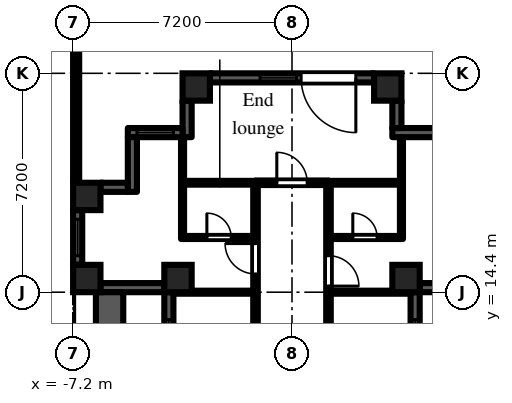
"""IFC4 building model, lengths in metres.
Left out: names, types, materials, properties, quantities, classifications, styles, units other than length and angle.
Written with IfcOpenShell. Run it as: python <this file> out.ifc"""

import sys

from ifc_helpers import new_model, si_unit, direction, frame, frame_2d, origin, origin_2d, place, context, subcontext, project, spatial, rectangle, extrude, element, fill, save


model = new_model("IFC4")
c1 = context("Model", 3, precision=1e-05, world=origin(), true_north=direction((0.0, 1.0)))
c2 = subcontext(c1, "Body", "Model", "MODEL_VIEW")
j1 = project(units=[si_unit("LENGTHUNIT", "METRE"), si_unit("PLANEANGLEUNIT", "RADIAN")], contexts=[c1])
p1 = place(None, origin())
s1 = spatial("IfcSite", under=j1, at=p1, CompositionType="ELEMENT")
p2 = place(p1, origin())
s2 = spatial("IfcBuilding", under=s1, at=p2, CompositionType="ELEMENT")
p3 = place(p2, frame((0.0, 0.0, 66.9)))
s3 = spatial("IfcBuildingStorey", under=s2, at=p3, CompositionType="ELEMENT", Elevation=66.9)
for number, where, z_axis, x_axis in (
    (1, (-6.75, 14.85, 0.0), (0.0, 0.0, 1.0), (1.0, 0.0, 0.0)),
    (2, (-6.75, 17.55, 0.0), (0.0, 0.0, 1.0), (1.0, 0.0, 0.0)),
    (3, (-3.75, 14.85, 0.0), (0.0, 0.0, 1.0), (1.0, 0.0, 0.0)),
    (4, (-3.15, 21.15, 0.0), (0.0, 0.0, 1.0), (1.0, 0.0, 0.0)),
    (5, (3.15, 21.15, 0.0), (0.0, 0.0, 1.0), (1.0, 0.0, 0.0)),
    (6, (3.75, 14.85, 0.0), (0.0, 0.0, 1.0), (1.0, 0.0, 0.0)),
):
    element("IfcColumn", number, at=place(p3, frame(where, z_axis=z_axis, x_axis=x_axis)), inside=s3, PredefinedType="COLUMN", context=c2, shape_type="SweptSolid", body=[
        extrude(rectangle(XDim=0.9, YDim=0.9, at=origin_2d()), origin(), (0.0, 0.0, 1.0), 3.0),
    ])
p4 = place(p3, frame((4.05, 7.2, 0.0), z_axis=(0.0, 0.0, 1.0), x_axis=(0.0, 1.0, 0.0)))
e7 = element("IfcWall", 7, at=p4, inside=s3, PredefinedType="SOLIDWALL", context=c2, shape_type="SweptSolid", body=[
    extrude(rectangle(XDim=7.2, YDim=0.3, at=frame_2d((3.6, 0.0))), origin(), (0.0, 0.0, 1.0), 2.1),
])
p5 = place(p4, frame((3.0, 0.0, 0.0)))
e8 = element("IfcOpeningElement", 8, at=p5, cuts=e7, PredefinedType="OPENING", context=c2, shape_type="SweptSolid", body=[
    extrude(rectangle(XDim=1.2, YDim=2.05, at=frame_2d((0.6, 1.025))), frame((0.0, 0.16, 0.0), z_axis=(0.0, -1.0, 0.0), x_axis=(1.0, 0.0, 0.0)), (0.0, 0.0, 1.0), 0.32),
])
p6 = place(p4, frame((0.9, 0.0, 0.2)))
e9 = element("IfcOpeningElement", 9, at=p6, cuts=e7, PredefinedType="OPENING", context=c2, shape_type="SweptSolid", body=[
    extrude(rectangle(XDim=1.8, YDim=1.85, at=frame_2d((0.9, 0.925))), frame((0.0, 0.16, 0.0), z_axis=(0.0, -1.0, 0.0), x_axis=(1.0, 0.0, 0.0)), (0.0, 0.0, 1.0), 0.32),
])
p7 = place(p4, frame((4.5, 0.0, 0.2)))
e10 = element("IfcOpeningElement", 10, at=p7, cuts=e7, PredefinedType="OPENING", context=c2, shape_type="SweptSolid", body=[
    extrude(rectangle(XDim=1.8, YDim=1.85, at=frame_2d((0.9, 0.925))), frame((0.0, 0.16, 0.0), z_axis=(0.0, -1.0, 0.0), x_axis=(1.0, 0.0, 0.0)), (0.0, 0.0, 1.0), 0.32),
])
p8 = place(p3, frame((4.2, 14.55, 0.0), z_axis=(0.0, 0.0, 1.0), x_axis=(1.0, 0.0, 0.0)))
e11 = element("IfcWall", 11, at=p8, inside=s3, PredefinedType="SOLIDWALL", context=c2, shape_type="SweptSolid", body=[
    extrude(rectangle(XDim=2.1, YDim=0.3, at=frame_2d((1.05, 0.0))), origin(), (0.0, 0.0, 1.0), 2.1),
])
p9 = place(p3, frame((5.1, 19.65, 0.0), z_axis=(0.0, 0.0, 1.0), x_axis=(-1.0, 0.0, 0.0)))
e12 = element("IfcWall", 12, at=p9, inside=s3, PredefinedType="SOLIDWALL", context=c2, shape_type="SweptSolid", body=[
    extrude(rectangle(XDim=1.8, YDim=0.3, at=frame_2d((0.9, 0.0))), origin(), (0.0, 0.0, 1.0), 2.575),
])
p10 = place(p3, frame((3.45, 19.8, 0.0), z_axis=(0.0, 0.0, 1.0), x_axis=(0.0, 1.0, 0.0)))
e13 = element("IfcWall", 13, at=p10, inside=s3, PredefinedType="SOLIDWALL", context=c2, shape_type="SweptSolid", body=[
    extrude(rectangle(XDim=0.9, YDim=0.3, at=frame_2d((0.45, 0.0))), origin(), (0.0, 0.0, 1.0), 2.575),
])
p11 = place(p3, frame((2.7, 21.45, 0.0), z_axis=(0.0, 0.0, 1.0), x_axis=(-1.0, 0.0, 0.0)))
e14 = element("IfcWall", 14, at=p11, inside=s3, PredefinedType="SOLIDWALL", context=c2, shape_type="SweptSolid", body=[
    extrude(rectangle(XDim=5.4, YDim=0.3, at=frame_2d((2.7, 0.0))), origin(), (0.0, 0.0, 1.0), 2.1),
])
p12 = place(p11, frame((0.6, 0.0, 0.0)))
e15 = element("IfcOpeningElement", 15, at=p12, cuts=e14, PredefinedType="OPENING", context=c2, shape_type="SweptSolid", body=[
    extrude(rectangle(XDim=1.8, YDim=2.05, at=frame_2d((0.9, 1.025))), frame((0.0, 0.16, 0.0), z_axis=(0.0, -1.0, 0.0), x_axis=(1.0, 0.0, 0.0)), (0.0, 0.0, 1.0), 0.32),
])
p13 = place(p11, frame((2.55, 0.0, 0.2)))
e16 = element("IfcOpeningElement", 16, at=p13, cuts=e14, PredefinedType="OPENING", context=c2, shape_type="SweptSolid", body=[
    extrude(rectangle(XDim=1.2, YDim=1.85, at=frame_2d((0.6, 0.925))), frame((0.0, 0.16, 0.0), z_axis=(0.0, -1.0, 0.0), x_axis=(1.0, 0.0, 0.0)), (0.0, 0.0, 1.0), 0.32),
])
p14 = place(p3, frame((-3.45, 20.7, 0.0), z_axis=(0.0, 0.0, 1.0), x_axis=(0.0, -1.0, 0.0)))
e17 = element("IfcWall", 17, at=p14, inside=s3, PredefinedType="SOLIDWALL", context=c2, shape_type="SweptSolid", body=[
    extrude(rectangle(XDim=1.2, YDim=0.3, at=frame_2d((0.6, 0.0))), origin(), (0.0, 0.0, 1.0), 2.575),
])
p15 = place(p3, frame((-3.6, 19.65, 0.0), z_axis=(0.0, 0.0, 1.0), x_axis=(-1.0, 0.0, 0.0)))
e18 = element("IfcWall", 18, at=p15, inside=s3, PredefinedType="SOLIDWALL", context=c2, shape_type="SweptSolid", body=[
    extrude(rectangle(XDim=1.8, YDim=0.3, at=frame_2d((0.9, 0.0))), origin(), (0.0, 0.0, 1.0), 2.575),
])
p16 = place(p15, frame((0.3, 0.0, 0.2)))
e19 = element("IfcOpeningElement", 19, at=p16, cuts=e18, PredefinedType="OPENING", context=c2, shape_type="SweptSolid", body=[
    extrude(rectangle(XDim=1.2, YDim=1.85, at=frame_2d((0.6, 0.925))), frame((0.0, 0.16, 0.0), z_axis=(0.0, -1.0, 0.0), x_axis=(1.0, 0.0, 0.0)), (0.0, 0.0, 1.0), 0.32),
])
p17 = place(p3, frame((-5.25, 19.5, 0.0), z_axis=(0.0, 0.0, 1.0), x_axis=(0.0, -1.0, 0.0)))
e20 = element("IfcWall", 20, at=p17, inside=s3, PredefinedType="SOLIDWALL", context=c2, shape_type="SweptSolid", body=[
    extrude(rectangle(XDim=1.8, YDim=0.3, at=frame_2d((0.9, 0.0))), origin(), (0.0, 0.0, 1.0), 2.575),
])
p18 = place(p3, frame((-5.4, 17.85, 0.0), z_axis=(0.0, 0.0, 1.0), x_axis=(-1.0, 0.0, 0.0)))
e21 = element("IfcWall", 21, at=p18, inside=s3, PredefinedType="SOLIDWALL", context=c2, shape_type="SweptSolid", body=[
    extrude(rectangle(XDim=0.9, YDim=0.3, at=frame_2d((0.45, 0.0))), origin(), (0.0, 0.0, 1.0), 2.575),
])
p19 = place(p3, frame((-7.05, 17.1, 0.0), z_axis=(0.0, 0.0, 1.0), x_axis=(0.0, -1.0, 0.0)))
e22 = element("IfcWall", 22, at=p19, inside=s3, PredefinedType="SOLIDWALL", context=c2, shape_type="SweptSolid", body=[
    extrude(rectangle(XDim=1.8, YDim=0.3, at=frame_2d((0.9, 0.0))), origin(), (0.0, 0.0, 1.0), 2.1),
])
p20 = place(p19, frame((0.3, 0.0, 0.2)))
e23 = element("IfcOpeningElement", 23, at=p20, cuts=e22, PredefinedType="OPENING", context=c2, shape_type="SweptSolid", body=[
    extrude(rectangle(XDim=1.2, YDim=1.85, at=frame_2d((0.6, 0.925))), frame((0.0, 0.16, 0.0), z_axis=(0.0, -1.0, 0.0), x_axis=(1.0, 0.0, 0.0)), (0.0, 0.0, 1.0), 0.32),
])
p21 = place(p3, frame((-6.3, 14.55, 0.0), z_axis=(0.0, 0.0, 1.0), x_axis=(1.0, 0.0, 0.0)))
e24 = element("IfcWall", 24, at=p21, inside=s3, PredefinedType="SOLIDWALL", context=c2, shape_type="SweptSolid", body=[
    extrude(rectangle(XDim=2.1, YDim=0.3, at=frame_2d((1.05, 0.0))), origin(), (0.0, 0.0, 1.0), 2.1),
])
p22 = place(p3, frame((-4.05, 14.4, 0.0), z_axis=(0.0, 0.0, 1.0), x_axis=(0.0, -1.0, 0.0)))
e25 = element("IfcWall", 25, at=p22, inside=s3, PredefinedType="SOLIDWALL", context=c2, shape_type="SweptSolid", body=[
    extrude(rectangle(XDim=7.2, YDim=0.3, at=frame_2d((3.6, 0.0))), origin(), (0.0, 0.0, 1.0), 2.1),
])
p23 = place(p22, frame((3.0, 0.0, 0.0)))
e26 = element("IfcOpeningElement", 26, at=p23, cuts=e25, PredefinedType="OPENING", context=c2, shape_type="SweptSolid", body=[
    extrude(rectangle(XDim=1.2, YDim=2.05, at=frame_2d((0.6, 1.025))), frame((0.0, 0.16, 0.0), z_axis=(0.0, -1.0, 0.0), x_axis=(1.0, 0.0, 0.0)), (0.0, 0.0, 1.0), 0.32),
])
p24 = place(p22, frame((0.9, 0.0, 0.2)))
e27 = element("IfcOpeningElement", 27, at=p24, cuts=e25, PredefinedType="OPENING", context=c2, shape_type="SweptSolid", body=[
    extrude(rectangle(XDim=1.8, YDim=1.85, at=frame_2d((0.9, 0.925))), frame((0.0, 0.16, 0.0), z_axis=(0.0, -1.0, 0.0), x_axis=(1.0, 0.0, 0.0)), (0.0, 0.0, 1.0), 0.32),
])
p25 = place(p22, frame((4.5, 0.0, 0.2)))
e28 = element("IfcOpeningElement", 28, at=p25, cuts=e25, PredefinedType="OPENING", context=c2, shape_type="SweptSolid", body=[
    extrude(rectangle(XDim=1.8, YDim=1.85, at=frame_2d((0.9, 0.925))), frame((0.0, 0.16, 0.0), z_axis=(0.0, -1.0, 0.0), x_axis=(1.0, 0.0, 0.0)), (0.0, 0.0, 1.0), 0.32),
])
p26 = place(p3, frame((-6.0, 7.2, 0.0), z_axis=(0.0, 0.0, 1.0), x_axis=(0.0, 1.0, 0.0)))
e29 = element("IfcWall", 29, at=p26, inside=s3, PredefinedType="PARAPET", context=c2, shape_type="SweptSolid", body=[
    extrude(rectangle(XDim=7.2, YDim=0.9, at=frame_2d((3.6, 0.0))), origin(), (0.0, 0.0, 1.0), 0.8),
])
p27 = place(p3, frame((-7.1, 39.6, 0.0), z_axis=(0.0, 0.0, 1.0), x_axis=(0.0, -1.0, 0.0)))
e30 = element("IfcWall", 30, at=p27, inside=s3, PredefinedType="PARAPET", context=c2, shape_type="SweptSolid", body=[
    extrude(rectangle(XDim=21.6, YDim=0.2, at=frame_2d((10.8, 0.0))), origin(), (0.0, 0.0, 1.0), 1.1),
])
p28 = place(p3, frame((-3.9, 14.4, 0.0), z_axis=(0.0, 0.0, 1.0), x_axis=(1.0, 0.0, 0.0)))
e31 = element("IfcWall", 31, at=p28, inside=s3, PredefinedType="PARTITIONING", context=c2, shape_type="SweptSolid", body=[
    extrude(rectangle(XDim=2.625, YDim=0.1, at=frame_2d((1.312, 0.0))), origin(), (0.0, 0.0, 1.0), 2.575),
])
p29 = place(p3, frame((-3.6, 16.15, 0.0), z_axis=(0.0, 0.0, 1.0), x_axis=(0.0, 1.0, 0.0)))
e32 = element("IfcWall", 32, at=p29, inside=s3, PredefinedType="PARTITIONING", context=c2, shape_type="SweptSolid", body=[
    extrude(rectangle(XDim=3.35, YDim=0.1, at=frame_2d((1.675, 0.0))), origin(), (0.0, 0.0, 1.0), 2.575),
])
p30 = place(p3, frame((-3.55, 16.2, 0.0), z_axis=(0.0, 0.0, 1.0), x_axis=(1.0, 0.0, 0.0)))
e33 = element("IfcWall", 33, at=p30, inside=s3, PredefinedType="PARTITIONING", context=c2, shape_type="SweptSolid", body=[
    extrude(rectangle(XDim=2.275, YDim=0.1, at=frame_2d((1.138, 0.0))), origin(), (0.0, 0.0, 1.0), 2.575),
])
p31 = place(p30, frame((0.75, 0.0, 0.0)))
e34 = element("IfcOpeningElement", 34, at=p31, cuts=e33, PredefinedType="OPENING", context=c2, shape_type="SweptSolid", body=[
    extrude(rectangle(XDim=0.8, YDim=2.1, at=frame_2d((0.4, 1.05))), frame((0.0, 0.06, 0.0), z_axis=(0.0, -1.0, 0.0), x_axis=(1.0, 0.0, 0.0)), (0.0, 0.0, 1.0), 0.12),
])
p32 = place(p3, frame((-3.55, 18.0, 0.0), z_axis=(0.0, 0.0, 1.0), x_axis=(1.0, 0.0, 0.0)))
e35 = element("IfcWall", 35, at=p32, inside=s3, PredefinedType="PARTITIONING", context=c2, shape_type="SweptSolid", body=[
    extrude(rectangle(XDim=2.35, YDim=0.125, at=frame_2d((1.175, 0.0))), origin(), (0.0, 0.0, 1.0), 2.575),
])
p33 = place(p3, frame((-1.2, 1.275, 0.0), z_axis=(0.0, 0.0, 1.0), x_axis=(0.0, 1.0, 0.0)))
e36 = element("IfcWall", 36, at=p33, inside=s3, PredefinedType="PARTITIONING", context=c2, shape_type="SweptSolid", body=[
    extrude(rectangle(XDim=16.65, YDim=0.15, at=frame_2d((8.325, 0.0))), origin(), (0.0, 0.0, 1.0), 2.575),
])
p34 = place(p33, frame((0.675, 0.0, 0.0)))
e37 = element("IfcOpeningElement", 37, at=p34, cuts=e36, PredefinedType="OPENING", context=c2, shape_type="SweptSolid", body=[
    extrude(rectangle(XDim=0.9, YDim=2.1, at=frame_2d((0.45, 1.05))), frame((0.0, 0.085, 0.0), z_axis=(0.0, -1.0, 0.0), x_axis=(1.0, 0.0, 0.0)), (0.0, 0.0, 1.0), 0.17),
])
p35 = place(p33, frame((3.675, 0.0, 0.0)))
e38 = element("IfcOpeningElement", 38, at=p35, cuts=e36, PredefinedType="OPENING", context=c2, shape_type="SweptSolid", body=[
    extrude(rectangle(XDim=0.9, YDim=2.1, at=frame_2d((0.45, 1.05))), frame((0.0, 0.085, 0.0), z_axis=(0.0, -1.0, 0.0), x_axis=(1.0, 0.0, 0.0)), (0.0, 0.0, 1.0), 0.17),
])
p36 = place(p33, frame((10.875, 0.0, 0.0)))
e39 = element("IfcOpeningElement", 39, at=p36, cuts=e36, PredefinedType="OPENING", context=c2, shape_type="SweptSolid", body=[
    extrude(rectangle(XDim=0.9, YDim=2.1, at=frame_2d((0.45, 1.05))), frame((0.0, 0.085, 0.0), z_axis=(0.0, -1.0, 0.0), x_axis=(1.0, 0.0, 0.0)), (0.0, 0.0, 1.0), 0.17),
])
p37 = place(p33, frame((13.725, 0.0, 0.0)))
e40 = element("IfcOpeningElement", 40, at=p37, cuts=e36, PredefinedType="OPENING", context=c2, shape_type="SweptSolid", body=[
    extrude(rectangle(XDim=1.0, YDim=2.1, at=frame_2d((0.5, 1.05))), frame((0.0, 0.085, 0.0), z_axis=(0.0, -1.0, 0.0), x_axis=(1.0, 0.0, 0.0)), (0.0, 0.0, 1.0), 0.17),
])
p38 = place(p3, frame((-1.2, 18.0, 0.0), z_axis=(0.0, 0.0, 1.0), x_axis=(1.0, 0.0, 0.0)))
e41 = element("IfcWall", 41, at=p38, inside=s3, PredefinedType="PARTITIONING", context=c2, shape_type="SweptSolid", body=[
    extrude(rectangle(XDim=2.4, YDim=0.15, at=frame_2d((1.2, 0.0))), origin(), (0.0, 0.0, 1.0), 2.575),
])
p39 = place(p38, frame((0.7, 0.0, 0.0)))
e42 = element("IfcOpeningElement", 42, at=p39, cuts=e41, PredefinedType="OPENING", context=c2, shape_type="SweptSolid", body=[
    extrude(rectangle(XDim=1.0, YDim=2.1, at=frame_2d((0.5, 1.05))), frame((0.0, 0.085, 0.0), z_axis=(0.0, -1.0, 0.0), x_axis=(1.0, 0.0, 0.0)), (0.0, 0.0, 1.0), 0.17),
])
p40 = place(p3, frame((1.2, 1.125, 0.0), z_axis=(0.0, 0.0, 1.0), x_axis=(0.0, 1.0, 0.0)))
e43 = element("IfcWall", 43, at=p40, inside=s3, PredefinedType="PARTITIONING", context=c2, shape_type="SweptSolid", body=[
    extrude(rectangle(XDim=16.8, YDim=0.15, at=frame_2d((8.4, 0.0))), origin(), (0.0, 0.0, 1.0), 2.575),
])
p41 = place(p40, frame((7.025, 0.0, 0.0)))
e44 = element("IfcOpeningElement", 44, at=p41, cuts=e43, PredefinedType="OPENING", context=c2, shape_type="SweptSolid", body=[
    extrude(rectangle(XDim=0.9, YDim=2.1, at=frame_2d((0.45, 1.05))), frame((0.0, 0.085, 0.0), z_axis=(0.0, -1.0, 0.0), x_axis=(1.0, 0.0, 0.0)), (0.0, 0.0, 1.0), 0.17),
])
p42 = place(p40, frame((10.625, 0.0, 0.0)))
e45 = element("IfcOpeningElement", 45, at=p42, cuts=e43, PredefinedType="OPENING", context=c2, shape_type="SweptSolid", body=[
    extrude(rectangle(XDim=0.9, YDim=2.1, at=frame_2d((0.45, 1.05))), frame((0.0, 0.085, 0.0), z_axis=(0.0, -1.0, 0.0), x_axis=(1.0, 0.0, 0.0)), (0.0, 0.0, 1.0), 0.17),
])
p43 = place(p40, frame((13.475, 0.0, 0.0)))
e46 = element("IfcOpeningElement", 46, at=p43, cuts=e43, PredefinedType="OPENING", context=c2, shape_type="SweptSolid", body=[
    extrude(rectangle(XDim=1.0, YDim=2.1, at=frame_2d((0.5, 1.05))), frame((0.0, 0.085, 0.0), z_axis=(0.0, -1.0, 0.0), x_axis=(1.0, 0.0, 0.0)), (0.0, 0.0, 1.0), 0.17),
])
p44 = place(p3, frame((1.275, 14.4, 0.0), z_axis=(0.0, 0.0, 1.0), x_axis=(1.0, 0.0, 0.0)))
e47 = element("IfcWall", 47, at=p44, inside=s3, PredefinedType="PARTITIONING", context=c2, shape_type="SweptSolid", body=[
    extrude(rectangle(XDim=2.625, YDim=0.1, at=frame_2d((1.312, 0.0))), origin(), (0.0, 0.0, 1.0), 2.575),
])
p45 = place(p3, frame((1.275, 16.2, 0.0), z_axis=(0.0, 0.0, 1.0), x_axis=(1.0, 0.0, 0.0)))
e48 = element("IfcWall", 48, at=p45, inside=s3, PredefinedType="PARTITIONING", context=c2, shape_type="SweptSolid", body=[
    extrude(rectangle(XDim=2.375, YDim=0.1, at=frame_2d((1.188, 0.0))), origin(), (0.0, 0.0, 1.0), 2.575),
])
p46 = place(p45, frame((0.725, 0.0, 0.0)))
e49 = element("IfcOpeningElement", 49, at=p46, cuts=e48, PredefinedType="OPENING", context=c2, shape_type="SweptSolid", body=[
    extrude(rectangle(XDim=0.8, YDim=2.1, at=frame_2d((0.4, 1.05))), frame((0.0, 0.06, 0.0), z_axis=(0.0, -1.0, 0.0), x_axis=(1.0, 0.0, 0.0)), (0.0, 0.0, 1.0), 0.12),
])
p47 = place(p3, frame((1.2, 18.0, 0.0), z_axis=(0.0, 0.0, 1.0), x_axis=(1.0, 0.0, 0.0)))
e50 = element("IfcWall", 50, at=p47, inside=s3, PredefinedType="PARTITIONING", context=c2, shape_type="SweptSolid", body=[
    extrude(rectangle(XDim=2.35, YDim=0.125, at=frame_2d((1.175, 0.0))), origin(), (0.0, 0.0, 1.0), 2.575),
])
p48 = place(p3, frame((3.6, 16.25, 0.0), z_axis=(0.0, 0.0, 1.0), x_axis=(0.0, 1.0, 0.0)))
e51 = element("IfcWall", 51, at=p48, inside=s3, PredefinedType="PARTITIONING", context=c2, shape_type="SweptSolid", body=[
    extrude(rectangle(XDim=3.25, YDim=0.1, at=frame_2d((1.625, 0.0))), origin(), (0.0, 0.0, 1.0), 2.575),
])
p49 = place(p7, origin())
e52 = element("IfcWindow", 52, at=p49, inside=s3, PartitioningType="SINGLE_PANEL", PredefinedType="WINDOW", context=c2, shape_type="SweptSolid", body=[
    extrude(rectangle(XDim=1.8, YDim=1.85, at=frame_2d((0.9, 0.925))), frame((0.0, 0.03, 0.0), z_axis=(0.0, -1.0, 0.0), x_axis=(1.0, 0.0, 0.0)), (0.0, 0.0, 1.0), 0.06),
])
fill(e10, e52)
p50 = place(p12, origin())
e53 = element("IfcDoor", 53, at=p50, inside=s3, OperationType="SINGLE_SWING_LEFT", PredefinedType="DOOR", context=c2, shape_type="SweptSolid", body=[
    extrude(rectangle(XDim=1.8, YDim=2.05, at=frame_2d((0.9, 1.025))), frame((0.0, 0.025, 0.0), z_axis=(0.0, -1.0, 0.0), x_axis=(1.0, 0.0, 0.0)), (0.0, 0.0, 1.0), 0.05),
])
fill(e15, e53)
p51 = place(p13, origin())
e54 = element("IfcWindow", 54, at=p51, inside=s3, PartitioningType="SINGLE_PANEL", PredefinedType="WINDOW", context=c2, shape_type="SweptSolid", body=[
    extrude(rectangle(XDim=1.2, YDim=1.85, at=frame_2d((0.6, 0.925))), frame((0.0, 0.03, 0.0), z_axis=(0.0, -1.0, 0.0), x_axis=(1.0, 0.0, 0.0)), (0.0, 0.0, 1.0), 0.06),
])
fill(e16, e54)
p52 = place(p16, origin())
e55 = element("IfcWindow", 55, at=p52, inside=s3, PartitioningType="SINGLE_PANEL", PredefinedType="WINDOW", context=c2, shape_type="SweptSolid", body=[
    extrude(rectangle(XDim=1.2, YDim=1.85, at=frame_2d((0.6, 0.925))), frame((0.0, 0.03, 0.0), z_axis=(0.0, -1.0, 0.0), x_axis=(1.0, 0.0, 0.0)), (0.0, 0.0, 1.0), 0.06),
])
fill(e19, e55)
p53 = place(p20, origin())
e56 = element("IfcWindow", 56, at=p53, inside=s3, PartitioningType="SINGLE_PANEL", PredefinedType="WINDOW", context=c2, shape_type="SweptSolid", body=[
    extrude(rectangle(XDim=1.2, YDim=1.85, at=frame_2d((0.6, 0.925))), frame((0.0, 0.03, 0.0), z_axis=(0.0, -1.0, 0.0), x_axis=(1.0, 0.0, 0.0)), (0.0, 0.0, 1.0), 0.06),
])
fill(e23, e56)
p54 = place(p24, origin())
e57 = element("IfcWindow", 57, at=p54, inside=s3, PartitioningType="SINGLE_PANEL", PredefinedType="WINDOW", context=c2, shape_type="SweptSolid", body=[
    extrude(rectangle(XDim=1.8, YDim=1.85, at=frame_2d((0.9, 0.925))), frame((0.0, 0.03, 0.0), z_axis=(0.0, -1.0, 0.0), x_axis=(1.0, 0.0, 0.0)), (0.0, 0.0, 1.0), 0.06),
])
fill(e27, e57)
p55 = place(p39, origin())
e58 = element("IfcDoor", 58, at=p55, inside=s3, OperationType="SINGLE_SWING_LEFT", PredefinedType="DOOR", context=c2, shape_type="SweptSolid", body=[
    extrude(rectangle(XDim=1.0, YDim=2.1, at=frame_2d((0.5, 1.05))), frame((0.0, 0.025, 0.0), z_axis=(0.0, -1.0, 0.0), x_axis=(1.0, 0.0, 0.0)), (0.0, 0.0, 1.0), 0.05),
])
fill(e42, e58)
p56 = place(p31, origin())
e59 = element("IfcDoor", 59, at=p56, inside=s3, OperationType="SINGLE_SWING_LEFT", PredefinedType="DOOR", context=c2, shape_type="SweptSolid", body=[
    extrude(rectangle(XDim=0.8, YDim=2.1, at=frame_2d((0.4, 1.05))), frame((0.0, 0.025, 0.0), z_axis=(0.0, -1.0, 0.0), x_axis=(1.0, 0.0, 0.0)), (0.0, 0.0, 1.0), 0.05),
])
fill(e34, e59)
p57 = place(p37, origin())
e60 = element("IfcDoor", 60, at=p57, inside=s3, OperationType="SINGLE_SWING_RIGHT", PredefinedType="DOOR", context=c2, shape_type="SweptSolid", body=[
    extrude(rectangle(XDim=1.0, YDim=2.1, at=frame_2d((0.5, 1.05))), frame((0.0, 0.025, 0.0), z_axis=(0.0, -1.0, 0.0), x_axis=(1.0, 0.0, 0.0)), (0.0, 0.0, 1.0), 0.05),
])
fill(e40, e60)
p58 = place(p46, origin())
e61 = element("IfcDoor", 61, at=p58, inside=s3, OperationType="SINGLE_SWING_LEFT", PredefinedType="DOOR", context=c2, shape_type="SweptSolid", body=[
    extrude(rectangle(XDim=0.8, YDim=2.1, at=frame_2d((0.4, 1.05))), frame((0.0, 0.025, 0.0), z_axis=(0.0, -1.0, 0.0), x_axis=(1.0, 0.0, 0.0)), (0.0, 0.0, 1.0), 0.05),
])
fill(e49, e61)
p59 = place(p43, frame((1.0, 0.0, 0.0), z_axis=(0.0, 0.0, 1.0), x_axis=(-1.0, 0.0, 0.0)))
e62 = element("IfcDoor", 62, at=p59, inside=s3, OperationType="SINGLE_SWING_RIGHT", PredefinedType="DOOR", context=c2, shape_type="SweptSolid", body=[
    extrude(rectangle(XDim=1.0, YDim=2.1, at=frame_2d((0.5, 1.05))), frame((0.0, 0.025, 0.0), z_axis=(0.0, -1.0, 0.0), x_axis=(1.0, 0.0, 0.0)), (0.0, 0.0, 1.0), 0.05),
])
fill(e46, e62)
save(model, sys.argv[1])
